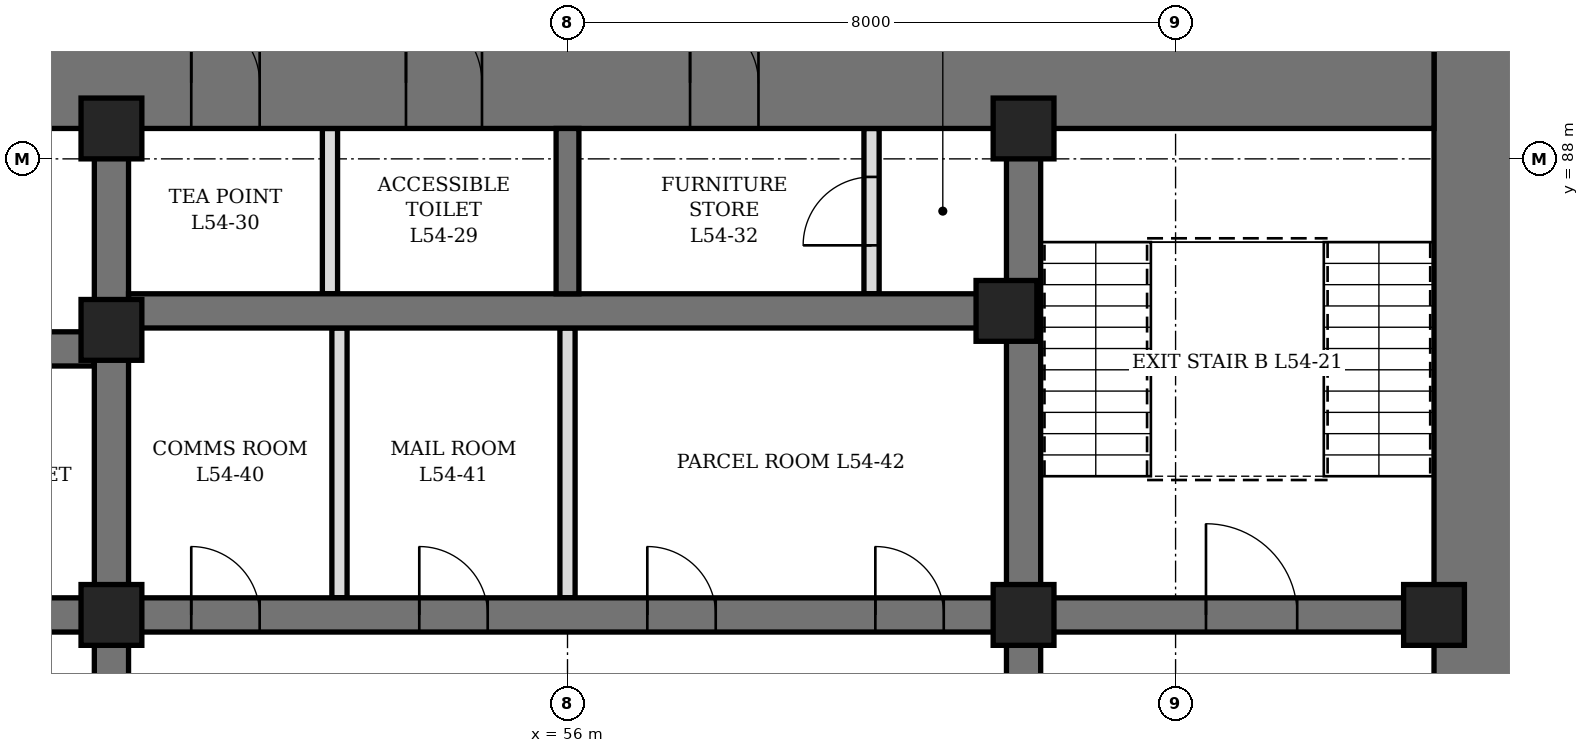
"""IFC4 building model, lengths in metres.
Left out: names, types, materials, properties, quantities, classifications, styles, units other than length and angle.
Written with IfcOpenShell. Run it as: python <this file> out.ifc"""

import sys

from ifc_helpers import new_model, si_unit, direction, frame, frame_2d, origin, origin_2d, place, context, subcontext, project, spatial, rectangle, hollow_rectangle, extrude, element, fill, save


model = new_model("IFC4")
c1 = context("Model", 3, precision=1e-05, world=origin(), true_north=direction((0.0, 1.0)))
c2 = subcontext(c1, "Body", "Model", "MODEL_VIEW")
j1 = project(units=[si_unit("LENGTHUNIT", "METRE"), si_unit("PLANEANGLEUNIT", "RADIAN")], contexts=[c1])
p1 = place(None, origin())
s1 = spatial("IfcSite", under=j1, at=p1, CompositionType="ELEMENT")
p2 = place(p1, origin())
s2 = spatial("IfcBuilding", under=s1, at=p2, CompositionType="ELEMENT")
p3 = place(p2, frame((0.0, 0.0, 240.1)))
s3 = spatial("IfcBuildingStorey", under=s2, at=p3, CompositionType="ELEMENT", Elevation=240.1)
p4 = place(p3, frame((68.0, 70.4, 0.0), z_axis=(0.0, 0.0, 1.0), x_axis=(0.0, 1.0, 0.0)))
e1 = element("IfcWall", 1, at=p4, inside=s3, PredefinedType="SHEAR", context=c2, shape_type="SweptSolid", body=[
    extrude(rectangle(XDim=19.2, YDim=1.2, at=frame_2d((9.6, 0.0))), origin(), (0.0, 0.0, 1.0), 4.2),
])
p5 = place(p4, frame((8.6, 0.0, 0.0)))
e2 = element("IfcOpeningElement", 2, at=p5, cuts=e1, PredefinedType="OPENING", context=c2, shape_type="SweptSolid", body=[
    extrude(rectangle(XDim=2.0, YDim=2.4, at=frame_2d((1.0, 1.2))), frame((0.0, 0.61, 0.0), z_axis=(0.0, -1.0, 0.0), x_axis=(1.0, 0.0, 0.0)), (0.0, 0.0, 1.0), 1.22),
])
p6 = place(p3, frame((44.6, 89.0, 0.0), z_axis=(0.0, 0.0, 1.0), x_axis=(1.0, 0.0, 0.0)))
e3 = element("IfcWall", 3, at=p6, inside=s3, PredefinedType="SHEAR", context=c2, shape_type="SweptSolid", body=[
    extrude(rectangle(XDim=22.8, YDim=1.2, at=frame_2d((11.4, 0.0))), origin(), (0.0, 0.0, 1.0), 4.2),
])
p7 = place(p6, frame((9.275, 0.0, 0.0)))
e4 = element("IfcOpeningElement", 4, at=p7, cuts=e3, PredefinedType="OPENING", context=c2, shape_type="SweptSolid", body=[
    extrude(rectangle(XDim=1.0, YDim=2.1, at=frame_2d((0.5, 1.05))), frame((0.0, 0.61, 0.0), z_axis=(0.0, -1.0, 0.0), x_axis=(1.0, 0.0, 0.0)), (0.0, 0.0, 1.0), 1.22),
])
p8 = place(p6, frame((6.45, 0.0, 0.0)))
e5 = element("IfcOpeningElement", 5, at=p8, cuts=e3, PredefinedType="OPENING", context=c2, shape_type="SweptSolid", body=[
    extrude(rectangle(XDim=0.9, YDim=2.1, at=frame_2d((0.45, 1.05))), frame((0.0, 0.61, 0.0), z_axis=(0.0, -1.0, 0.0), x_axis=(1.0, 0.0, 0.0)), (0.0, 0.0, 1.0), 1.22),
])
p9 = place(p6, frame((13.012, 0.0, 0.0)))
e6 = element("IfcOpeningElement", 6, at=p9, cuts=e3, PredefinedType="OPENING", context=c2, shape_type="SweptSolid", body=[
    extrude(rectangle(XDim=0.9, YDim=2.1, at=frame_2d((0.45, 1.05))), frame((0.0, 0.61, 0.0), z_axis=(0.0, -1.0, 0.0), x_axis=(1.0, 0.0, 0.0)), (0.0, 0.0, 1.0), 1.22),
])
p10 = place(p3, frame((50.0, 71.6, 0.0), z_axis=(0.0, 0.0, 1.0), x_axis=(0.0, 1.0, 0.0)))
e7 = element("IfcWall", 7, at=p10, inside=s3, PredefinedType="SHEAR", context=c2, shape_type="SweptSolid", body=[
    extrude(rectangle(XDim=16.8, YDim=0.45, at=frame_2d((8.4, 0.0))), origin(), (0.0, 0.0, 1.0), 4.2),
])
p11 = place(p10, frame((7.5, 0.0, 0.0)))
e8 = element("IfcOpeningElement", 8, at=p11, cuts=e7, PredefinedType="OPENING", context=c2, shape_type="SweptSolid", body=[
    extrude(rectangle(XDim=1.8, YDim=2.4, at=frame_2d((0.9, 1.2))), frame((0.0, 0.235, 0.0), z_axis=(0.0, -1.0, 0.0), x_axis=(1.0, 0.0, 0.0)), (0.0, 0.0, 1.0), 0.47),
])
p12 = place(p3, frame((62.0, 71.6, 0.0), z_axis=(0.0, 0.0, 1.0), x_axis=(0.0, 1.0, 0.0)))
e9 = element("IfcWall", 9, at=p12, inside=s3, PredefinedType="SHEAR", context=c2, shape_type="SweptSolid", body=[
    extrude(rectangle(XDim=16.8, YDim=0.45, at=frame_2d((8.4, 0.0))), origin(), (0.0, 0.0, 1.0), 4.2),
])
p13 = place(p12, frame((7.5, 0.0, 0.0)))
e10 = element("IfcOpeningElement", 10, at=p13, cuts=e9, PredefinedType="OPENING", context=c2, shape_type="SweptSolid", body=[
    extrude(rectangle(XDim=1.8, YDim=2.4, at=frame_2d((0.9, 1.2))), frame((0.0, 0.235, 0.0), z_axis=(0.0, -1.0, 0.0), x_axis=(1.0, 0.0, 0.0)), (0.0, 0.0, 1.0), 0.47),
])
p14 = place(p3, frame((44.6, 82.0, 0.0), z_axis=(0.0, 0.0, 1.0), x_axis=(1.0, 0.0, 0.0)))
e11 = element("IfcWall", 11, at=p14, inside=s3, PredefinedType="SHEAR", context=c2, shape_type="SweptSolid", body=[
    extrude(rectangle(XDim=5.175, YDim=0.45, at=frame_2d((2.587, 0.0))), origin(), (0.0, 0.0, 1.0), 4.2),
])
p15 = place(p14, frame((0.7, 0.0, 0.0)))
e12 = element("IfcOpeningElement", 12, at=p15, cuts=e11, PredefinedType="OPENING", context=c2, shape_type="SweptSolid", body=[
    extrude(rectangle(XDim=0.9, YDim=2.1, at=frame_2d((0.45, 1.05))), frame((0.0, 0.235, 0.0), z_axis=(0.0, -1.0, 0.0), x_axis=(1.0, 0.0, 0.0)), (0.0, 0.0, 1.0), 0.47),
])
p16 = place(p3, frame((44.6, 85.5, 0.0), z_axis=(0.0, 0.0, 1.0), x_axis=(1.0, 0.0, 0.0)))
e13 = element("IfcWall", 13, at=p16, inside=s3, PredefinedType="SHEAR", context=c2, shape_type="SweptSolid", body=[
    extrude(rectangle(XDim=5.175, YDim=0.45, at=frame_2d((2.587, 0.0))), origin(), (0.0, 0.0, 1.0), 4.2),
])
p17 = place(p16, frame((0.7, 0.0, 0.0)))
e14 = element("IfcOpeningElement", 14, at=p17, cuts=e13, PredefinedType="OPENING", context=c2, shape_type="SweptSolid", body=[
    extrude(rectangle(XDim=0.9, YDim=2.1, at=frame_2d((0.45, 1.05))), frame((0.0, 0.235, 0.0), z_axis=(0.0, -1.0, 0.0), x_axis=(1.0, 0.0, 0.0)), (0.0, 0.0, 1.0), 0.47),
])
p18 = place(p3, frame((62.225, 82.0, 0.0), z_axis=(0.0, 0.0, 1.0), x_axis=(1.0, 0.0, 0.0)))
e15 = element("IfcWall", 15, at=p18, inside=s3, PredefinedType="SHEAR", context=c2, shape_type="SweptSolid", body=[
    extrude(rectangle(XDim=5.175, YDim=0.45, at=frame_2d((2.587, 0.0))), origin(), (0.0, 0.0, 1.0), 4.2),
])
p19 = place(p18, frame((2.175, 0.0, 0.0)))
e16 = element("IfcOpeningElement", 16, at=p19, cuts=e15, PredefinedType="OPENING", context=c2, shape_type="SweptSolid", body=[
    extrude(rectangle(XDim=1.2, YDim=2.1, at=frame_2d((0.6, 1.05))), frame((0.0, 0.235, 0.0), z_axis=(0.0, -1.0, 0.0), x_axis=(1.0, 0.0, 0.0)), (0.0, 0.0, 1.0), 0.47),
])
p20 = place(p3, frame((50.225, 82.0, 0.0), z_axis=(0.0, 0.0, 1.0), x_axis=(1.0, 0.0, 0.0)))
e17 = element("IfcWall", 17, at=p20, inside=s3, PredefinedType="SHEAR", context=c2, shape_type="SweptSolid", body=[
    extrude(rectangle(XDim=11.55, YDim=0.45, at=frame_2d((5.775, 0.0))), origin(), (0.0, 0.0, 1.0), 4.2),
])
p21 = place(p20, frame((0.825, 0.0, 0.0)))
e18 = element("IfcOpeningElement", 18, at=p21, cuts=e17, PredefinedType="OPENING", context=c2, shape_type="SweptSolid", body=[
    extrude(rectangle(XDim=0.9, YDim=2.1, at=frame_2d((0.45, 1.05))), frame((0.0, 0.235, 0.0), z_axis=(0.0, -1.0, 0.0), x_axis=(1.0, 0.0, 0.0)), (0.0, 0.0, 1.0), 0.47),
])
p22 = place(p20, frame((3.825, 0.0, 0.0)))
e19 = element("IfcOpeningElement", 19, at=p22, cuts=e17, PredefinedType="OPENING", context=c2, shape_type="SweptSolid", body=[
    extrude(rectangle(XDim=0.9, YDim=2.1, at=frame_2d((0.45, 1.05))), frame((0.0, 0.235, 0.0), z_axis=(0.0, -1.0, 0.0), x_axis=(1.0, 0.0, 0.0)), (0.0, 0.0, 1.0), 0.47),
])
p23 = place(p20, frame((6.825, 0.0, 0.0)))
e20 = element("IfcOpeningElement", 20, at=p23, cuts=e17, PredefinedType="OPENING", context=c2, shape_type="SweptSolid", body=[
    extrude(rectangle(XDim=0.9, YDim=2.1, at=frame_2d((0.45, 1.05))), frame((0.0, 0.235, 0.0), z_axis=(0.0, -1.0, 0.0), x_axis=(1.0, 0.0, 0.0)), (0.0, 0.0, 1.0), 0.47),
])
p24 = place(p20, frame((9.825, 0.0, 0.0)))
e21 = element("IfcOpeningElement", 21, at=p24, cuts=e17, PredefinedType="OPENING", context=c2, shape_type="SweptSolid", body=[
    extrude(rectangle(XDim=0.9, YDim=2.1, at=frame_2d((0.45, 1.05))), frame((0.0, 0.235, 0.0), z_axis=(0.0, -1.0, 0.0), x_axis=(1.0, 0.0, 0.0)), (0.0, 0.0, 1.0), 0.47),
])
p25 = place(p3, frame((50.225, 86.0, 0.0), z_axis=(0.0, 0.0, 1.0), x_axis=(1.0, 0.0, 0.0)))
e22 = element("IfcWall", 22, at=p25, inside=s3, PredefinedType="SHEAR", context=c2, shape_type="SweptSolid", body=[
    extrude(rectangle(XDim=11.55, YDim=0.45, at=frame_2d((5.775, 0.0))), origin(), (0.0, 0.0, 1.0), 4.2),
])
p26 = place(p3, frame((56.0, 86.225, 0.0), z_axis=(0.0, 0.0, 1.0), x_axis=(0.0, 1.0, 0.0)))
e23 = element("IfcWall", 23, at=p26, inside=s3, PredefinedType="SHEAR", context=c2, shape_type="SweptSolid", body=[
    extrude(rectangle(XDim=2.175, YDim=0.3, at=frame_2d((1.087, 0.0))), origin(), (0.0, 0.0, 1.0), 4.2),
])
for number, where, z_axis, x_axis in (
    (24, (50.0, 82.0, 0.0), (0.0, 0.0, 1.0), (1.0, 0.0, 0.0)),
    (25, (50.0, 85.75, 0.0), (0.0, 0.0, 1.0), (1.0, 0.0, 0.0)),
    (26, (50.0, 88.4, 0.0), (0.0, 0.0, 1.0), (1.0, 0.0, 0.0)),
    (27, (61.775, 86.0, 0.0), (0.0, 0.0, 1.0), (1.0, 0.0, 0.0)),
    (28, (62.0, 82.0, 0.0), (0.0, 0.0, 1.0), (1.0, 0.0, 0.0)),
    (29, (62.0, 88.4, 0.0), (0.0, 0.0, 1.0), (1.0, 0.0, 0.0)),
    (30, (67.4, 82.0, 0.0), (0.0, 0.0, 1.0), (1.0, 0.0, 0.0)),
):
    element("IfcColumn", number, at=place(p3, frame(where, z_axis=z_axis, x_axis=x_axis)), inside=s3, PredefinedType="COLUMN", context=c2, shape_type="SweptSolid", body=[
        extrude(hollow_rectangle(XDim=0.8, YDim=0.8, WallThickness=0.1, at=origin_2d()), origin(), (0.0, 0.0, 1.0), 4.2),
    ])
p27 = place(p3, frame((52.875, 86.225, 0.0), z_axis=(0.0, 0.0, 1.0), x_axis=(0.0, 1.0, 0.0)))
e31 = element("IfcWall", 31, at=p27, inside=s3, PredefinedType="PARTITIONING", context=c2, shape_type="SweptSolid", body=[
    extrude(rectangle(XDim=2.175, YDim=0.2, at=frame_2d((1.087, 0.0))), origin(), (0.0, 0.0, 1.0), 3.95),
])
p28 = place(p3, frame((60.0, 86.225, 0.0), z_axis=(0.0, 0.0, 1.0), x_axis=(0.0, 1.0, 0.0)))
e32 = element("IfcWall", 32, at=p28, inside=s3, PredefinedType="PARTITIONING", context=c2, shape_type="SweptSolid", body=[
    extrude(rectangle(XDim=2.175, YDim=0.2, at=frame_2d((1.087, 0.0))), origin(), (0.0, 0.0, 1.0), 3.95),
])
p29 = place(p28, frame((0.637, 0.0, 0.0)))
e33 = element("IfcOpeningElement", 33, at=p29, cuts=e32, PredefinedType="OPENING", context=c2, shape_type="SweptSolid", body=[
    extrude(rectangle(XDim=0.9, YDim=2.1, at=frame_2d((0.45, 1.05))), frame((0.0, 0.11, 0.0), z_axis=(0.0, -1.0, 0.0), x_axis=(1.0, 0.0, 0.0)), (0.0, 0.0, 1.0), 0.22),
])
p30 = place(p3, frame((53.0, 82.225, 0.0), z_axis=(0.0, 0.0, 1.0), x_axis=(0.0, 1.0, 0.0)))
e34 = element("IfcWall", 34, at=p30, inside=s3, PredefinedType="PARTITIONING", context=c2, shape_type="SweptSolid", body=[
    extrude(rectangle(XDim=3.55, YDim=0.2, at=frame_2d((1.775, 0.0))), origin(), (0.0, 0.0, 1.0), 3.95),
])
p31 = place(p3, frame((56.0, 82.225, 0.0), z_axis=(0.0, 0.0, 1.0), x_axis=(0.0, 1.0, 0.0)))
e35 = element("IfcWall", 35, at=p31, inside=s3, PredefinedType="PARTITIONING", context=c2, shape_type="SweptSolid", body=[
    extrude(rectangle(XDim=3.55, YDim=0.2, at=frame_2d((1.775, 0.0))), origin(), (0.0, 0.0, 1.0), 3.05),
])
p32 = place(p7, origin())
e36 = element("IfcDoor", 36, at=p32, inside=s3, OperationType="SINGLE_SWING_LEFT", PredefinedType="DOOR", context=c2, shape_type="SweptSolid", body=[
    extrude(rectangle(XDim=1.0, YDim=2.1, at=frame_2d((0.5, 1.05))), frame((0.0, 0.35, 0.0), z_axis=(0.0, -1.0, 0.0), x_axis=(1.0, 0.0, 0.0)), (0.0, 0.0, 1.0), 0.7),
])
fill(e4, e36)
p33 = place(p8, origin())
e37 = element("IfcDoor", 37, at=p33, inside=s3, OperationType="SINGLE_SWING_LEFT", PredefinedType="DOOR", context=c2, shape_type="SweptSolid", body=[
    extrude(rectangle(XDim=0.9, YDim=2.1, at=frame_2d((0.45, 1.05))), frame((0.0, 0.35, 0.0), z_axis=(0.0, -1.0, 0.0), x_axis=(1.0, 0.0, 0.0)), (0.0, 0.0, 1.0), 0.7),
])
fill(e5, e37)
p34 = place(p9, origin())
e38 = element("IfcDoor", 38, at=p34, inside=s3, OperationType="SINGLE_SWING_LEFT", PredefinedType="DOOR", context=c2, shape_type="SweptSolid", body=[
    extrude(rectangle(XDim=0.9, YDim=2.1, at=frame_2d((0.45, 1.05))), frame((0.0, 0.35, 0.0), z_axis=(0.0, -1.0, 0.0), x_axis=(1.0, 0.0, 0.0)), (0.0, 0.0, 1.0), 0.7),
])
fill(e6, e38)
p35 = place(p29, origin())
e39 = element("IfcDoor", 39, at=p35, inside=s3, OperationType="SINGLE_SWING_LEFT", PredefinedType="DOOR", context=c2, shape_type="SweptSolid", body=[
    extrude(rectangle(XDim=0.9, YDim=2.1, at=frame_2d((0.45, 1.05))), frame((0.0, 0.1, 0.0), z_axis=(0.0, -1.0, 0.0), x_axis=(1.0, 0.0, 0.0)), (0.0, 0.0, 1.0), 0.199),
])
fill(e33, e39)
p36 = place(p21, origin())
e40 = element("IfcDoor", 40, at=p36, inside=s3, OperationType="SINGLE_SWING_LEFT", PredefinedType="DOOR", context=c2, shape_type="SweptSolid", body=[
    extrude(rectangle(XDim=0.9, YDim=2.1, at=frame_2d((0.45, 1.05))), frame((0.0, 0.225, 0.0), z_axis=(0.0, -1.0, 0.0), x_axis=(1.0, 0.0, 0.0)), (0.0, 0.0, 1.0), 0.449),
])
fill(e18, e40)
p37 = place(p22, origin())
e41 = element("IfcDoor", 41, at=p37, inside=s3, OperationType="SINGLE_SWING_LEFT", PredefinedType="DOOR", context=c2, shape_type="SweptSolid", body=[
    extrude(rectangle(XDim=0.9, YDim=2.1, at=frame_2d((0.45, 1.05))), frame((0.0, 0.225, 0.0), z_axis=(0.0, -1.0, 0.0), x_axis=(1.0, 0.0, 0.0)), (0.0, 0.0, 1.0), 0.449),
])
fill(e19, e41)
p38 = place(p23, origin())
e42 = element("IfcDoor", 42, at=p38, inside=s3, OperationType="SINGLE_SWING_LEFT", PredefinedType="DOOR", context=c2, shape_type="SweptSolid", body=[
    extrude(rectangle(XDim=0.9, YDim=2.1, at=frame_2d((0.45, 1.05))), frame((0.0, 0.225, 0.0), z_axis=(0.0, -1.0, 0.0), x_axis=(1.0, 0.0, 0.0)), (0.0, 0.0, 1.0), 0.449),
])
fill(e20, e42)
p39 = place(p24, origin())
e43 = element("IfcDoor", 43, at=p39, inside=s3, OperationType="SINGLE_SWING_LEFT", PredefinedType="DOOR", context=c2, shape_type="SweptSolid", body=[
    extrude(rectangle(XDim=0.9, YDim=2.1, at=frame_2d((0.45, 1.05))), frame((0.0, 0.225, 0.0), z_axis=(0.0, -1.0, 0.0), x_axis=(1.0, 0.0, 0.0)), (0.0, 0.0, 1.0), 0.449),
])
fill(e21, e43)
p40 = place(p19, origin())
e44 = element("IfcDoor", 44, at=p40, inside=s3, OperationType="SINGLE_SWING_LEFT", PredefinedType="DOOR", context=c2, shape_type="SweptSolid", body=[
    extrude(rectangle(XDim=1.2, YDim=2.1, at=frame_2d((0.6, 1.05))), frame((0.0, 0.225, 0.0), z_axis=(0.0, -1.0, 0.0), x_axis=(1.0, 0.0, 0.0)), (0.0, 0.0, 1.0), 0.449),
])
fill(e16, e44)
save(model, sys.argv[1])
